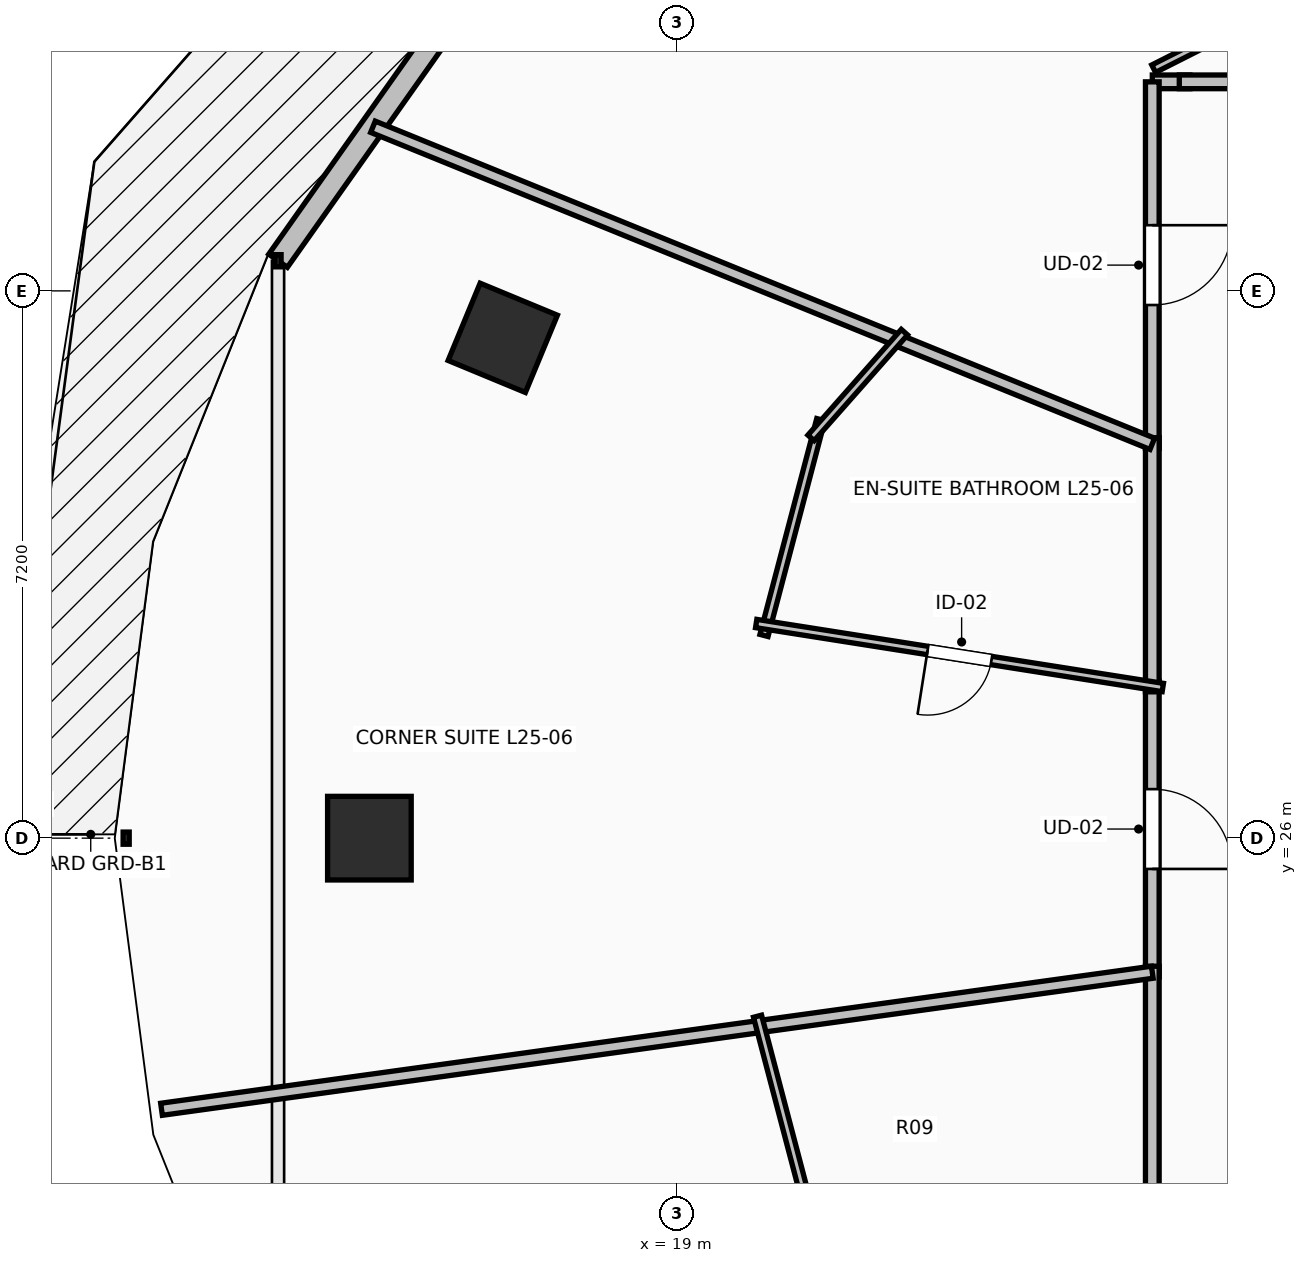
"""IFC4 building model, lengths in metres.
Left out: names, types, materials, properties, quantities, classifications, styles, units other than length and angle.
Written with IfcOpenShell. Run it as: python <this file> out.ifc"""

import sys

from ifc_helpers import new_model, si_unit, direction, frame, frame_2d, origin, origin_2d, place, context, subcontext, project, spatial, rectangle, extrude, element, fill, save


model = new_model("IFC4")
c1 = context("Model", 3, precision=1e-05, world=origin(), true_north=direction((0.0, 1.0)))
c2 = subcontext(c1, "Body", "Model", "MODEL_VIEW")
j1 = project(units=[si_unit("LENGTHUNIT", "METRE"), si_unit("PLANEANGLEUNIT", "RADIAN")], contexts=[c1])
p1 = place(None, origin())
s1 = spatial("IfcSite", under=j1, at=p1, CompositionType="ELEMENT")
p2 = place(p1, origin())
s2 = spatial("IfcBuilding", under=s1, at=p2, CompositionType="ELEMENT")
p3 = place(p2, frame((0.0, 0.0, 96.3)))
s3 = spatial("IfcBuildingStorey", under=s2, at=p3, CompositionType="ELEMENT", Elevation=96.3)
for number, where, z_axis, x_axis in (
    (1, (16.705, 32.582, 0.0), (0.0, 0.0, 1.0), (-0.924, 0.383, 0.0)),
    (2, (14.95, 26.0, 0.0), (0.0, 0.0, 1.0), (-1.0, 0.0, 0.0)),
):
    element("IfcColumn", number, at=place(p3, frame(where, z_axis=z_axis, x_axis=x_axis)), inside=s3, PredefinedType="COLUMN", context=c2, shape_type="SweptSolid", body=[
        extrude(rectangle(XDim=1.1, YDim=1.1, at=origin_2d()), origin(), (0.0, 0.0, 1.0), 3.5),
    ])
p4 = place(p3, frame((16.174, 37.028, 0.0), z_axis=(0.0, 0.0, 1.0), x_axis=(-0.57716435238, -0.81662801222, 0.0)))
e3 = element("IfcWall", 3, at=p4, inside=s3, PredefinedType="STANDARD", context=c2, shape_type="SweptSolid", body=[
    extrude(rectangle(XDim=4.202, YDim=0.3, at=frame_2d((2.101, 0.0))), origin(), (0.0, 0.0, 1.0), 3.24),
])
p5 = place(p3, frame((25.745, 35.95, 0.0), z_axis=(0.0, 0.0, 1.0), x_axis=(-1.0, 0.0, 0.0)))
e4 = element("IfcWall", 4, at=p5, inside=s3, PredefinedType="PARTITIONING", context=c2, shape_type="SweptSolid", body=[
    extrude(rectangle(XDim=0.495, YDim=0.18, at=frame_2d((0.248, 0.0))), origin(), (0.0, 0.0, 1.0), 3.24),
])
p6 = place(p3, frame((25.25, 35.95, 0.0), z_axis=(0.0, 0.0, 1.0), x_axis=(0.0, -1.0, 0.0)))
e5 = element("IfcWall", 5, at=p6, inside=s3, PredefinedType="PARTITIONING", context=c2, shape_type="SweptSolid", body=[
    extrude(rectangle(XDim=4.822, YDim=0.18, at=frame_2d((2.411, 0.0))), origin(), (0.0, 0.0, 1.0), 2.432),
])
p7 = place(p6, frame((1.886, 0.0, 0.0)))
e6 = element("IfcOpeningElement", 6, at=p7, cuts=e5, PredefinedType="OPENING", context=c2, shape_type="SweptSolid", body=[
    extrude(rectangle(XDim=1.05, YDim=2.2, at=frame_2d((0.525, 1.1))), frame((0.0, 0.105, 0.0), z_axis=(0.0, -1.0, 0.0), x_axis=(1.0, 0.0, 0.0)), (0.0, 0.0, 1.0), 0.21),
])
p8 = place(p3, frame((30.327, 35.95, 0.0), z_axis=(0.0, 0.0, 1.0), x_axis=(-1.0, 0.0, 0.0)))
e7 = element("IfcWall", 7, at=p8, inside=s3, PredefinedType="PARTITIONING", context=c2, shape_type="SweptSolid", body=[
    extrude(rectangle(XDim=4.722, YDim=0.18, at=frame_2d((2.361, 0.0))), origin(), (0.0, 0.0, 1.0), 2.432),
])
p9 = place(p3, frame((25.25, 28.065, 0.0), z_axis=(0.0, 0.0, 1.0), x_axis=(0.0, -1.0, 0.0)))
e8 = element("IfcWall", 8, at=p9, inside=s3, PredefinedType="PARTITIONING", context=c2, shape_type="SweptSolid", body=[
    extrude(rectangle(XDim=3.89, YDim=0.18, at=frame_2d((1.945, 0.0))), origin(), (0.0, 0.0, 1.0), 2.432),
])
p10 = place(p9, frame((1.42, 0.0, 0.0)))
e9 = element("IfcOpeningElement", 9, at=p10, cuts=e8, PredefinedType="OPENING", context=c2, shape_type="SweptSolid", body=[
    extrude(rectangle(XDim=1.05, YDim=2.2, at=frame_2d((0.525, 1.1))), frame((0.0, 0.105, 0.0), z_axis=(0.0, -1.0, 0.0), x_axis=(1.0, 0.0, 0.0)), (0.0, 0.0, 1.0), 0.21),
])
p11 = place(p3, frame((25.25, 31.268, 0.0), z_axis=(0.0, 0.0, 1.0), x_axis=(0.0, -1.0, 0.0)))
e10 = element("IfcWall", 10, at=p11, inside=s3, PredefinedType="PARTITIONING", context=c2, shape_type="SweptSolid", body=[
    extrude(rectangle(XDim=3.343, YDim=0.18, at=frame_2d((1.671, 0.0))), origin(), (0.0, 0.0, 1.0), 2.432),
])
p12 = place(p3, frame((25.25, 24.315, 0.0), z_axis=(0.0, 0.0, 1.0), x_axis=(0.0, -1.0, 0.0)))
e11 = element("IfcWall", 11, at=p12, inside=s3, PredefinedType="PARTITIONING", context=c2, shape_type="SweptSolid", body=[
    extrude(rectangle(XDim=3.308, YDim=0.18, at=frame_2d((1.654, 0.0))), origin(), (0.0, 0.0, 1.0), 3.24),
])
p13 = place(p3, frame((24.749, 43.041, 0.0), z_axis=(0.0, 0.0, 1.0), x_axis=(0.61384652665, -0.789425387051, 0.0)))
e12 = element("IfcWall", 12, at=p13, inside=s3, PredefinedType="PARTITIONING", context=c2, shape_type="SweptSolid", body=[
    extrude(rectangle(XDim=8.983, YDim=0.16, at=frame_2d((4.491, 0.0))), origin(), (0.0, 0.0, 1.0), 2.432),
])
p14 = place(p3, frame((25.268, 36.123, 0.0), z_axis=(0.0, 0.0, 1.0), x_axis=(0.892501687321, 0.451044053425, 0.0)))
e13 = element("IfcWall", 13, at=p14, inside=s3, PredefinedType="PARTITIONING", context=c2, shape_type="SweptSolid", body=[
    extrude(rectangle(XDim=4.049, YDim=0.11, at=frame_2d((2.025, 0.0))), origin(), (0.0, 0.0, 1.0), 2.432),
])
p15 = place(p14, frame((1.6, 0.0, 0.0)))
e14 = element("IfcOpeningElement", 14, at=p15, cuts=e13, PredefinedType="OPENING", context=c2, shape_type="SweptSolid", body=[
    extrude(rectangle(XDim=0.85, YDim=2.1, at=frame_2d((0.425, 1.05))), frame((0.0, 0.07, 0.0), z_axis=(0.0, -1.0, 0.0), x_axis=(1.0, 0.0, 0.0)), (0.0, 0.0, 1.0), 0.14),
])
p16 = place(p3, frame((14.997, 35.359, 0.0), z_axis=(0.0, 0.0, 1.0), x_axis=(0.926288615834, -0.376814808861, 0.0)))
e15 = element("IfcWall", 15, at=p16, inside=s3, PredefinedType="PARTITIONING", context=c2, shape_type="SweptSolid", body=[
    extrude(rectangle(XDim=11.069, YDim=0.16, at=frame_2d((5.534, 0.0))), origin(), (0.0, 0.0, 1.0), 2.677),
])
p17 = place(p3, frame((20.141, 28.667, 0.0), z_axis=(0.0, 0.0, 1.0), x_axis=(0.254489206931, 0.967075614187, 0.0)))
e16 = element("IfcWall", 16, at=p17, inside=s3, PredefinedType="PARTITIONING", context=c2, shape_type="SweptSolid", body=[
    extrude(rectangle(XDim=2.937, YDim=0.11, at=frame_2d((1.468, 0.0))), origin(), (0.0, 0.0, 1.0), 2.432),
])
p18 = place(p3, frame((20.76, 31.266, 0.0), z_axis=(0.0, 0.0, 1.0), x_axis=(0.662008805554, 0.749496058275, 0.0)))
e17 = element("IfcWall", 17, at=p18, inside=s3, PredefinedType="PARTITIONING", context=c2, shape_type="SweptSolid", body=[
    extrude(rectangle(XDim=1.856, YDim=0.11, at=frame_2d((0.928, 0.0))), origin(), (0.0, 0.0, 1.0), 2.922),
])
p19 = place(p3, frame((25.388, 27.982, 0.0), z_axis=(0.0, 0.0, 1.0), x_axis=(-0.98785054141, 0.155406910513, 0.0)))
e18 = element("IfcWall", 18, at=p19, inside=s3, PredefinedType="PARTITIONING", context=c2, shape_type="SweptSolid", body=[
    extrude(rectangle(XDim=5.415, YDim=0.11, at=frame_2d((2.708, 0.0))), origin(), (0.0, 0.0, 1.0), 2.432),
])
p20 = place(p19, frame((2.283, 0.0, 0.0)))
e19 = element("IfcOpeningElement", 19, at=p20, cuts=e18, PredefinedType="OPENING", context=c2, shape_type="SweptSolid", body=[
    extrude(rectangle(XDim=0.85, YDim=2.1, at=frame_2d((0.425, 1.05))), frame((0.0, 0.07, 0.0), z_axis=(0.0, -1.0, 0.0), x_axis=(1.0, 0.0, 0.0)), (0.0, 0.0, 1.0), 0.14),
])
p21 = place(p3, frame((12.215, 22.433, 0.0), z_axis=(0.0, 0.0, 1.0), x_axis=(0.990569013426, 0.137014705927, 0.0)))
e20 = element("IfcWall", 20, at=p21, inside=s3, PredefinedType="PARTITIONING", context=c2, shape_type="SweptSolid", body=[
    extrude(rectangle(XDim=13.159, YDim=0.16, at=frame_2d((6.58, 0.0))), origin(), (0.0, 0.0, 1.0), 2.677),
])
p22 = place(p3, frame((20.889, 20.494, 0.0), z_axis=(0.0, 0.0, 1.0), x_axis=(-0.254405137241, 0.967097733502, 0.0)))
e21 = element("IfcWall", 21, at=p22, inside=s3, PredefinedType="PARTITIONING", context=c2, shape_type="SweptSolid", body=[
    extrude(rectangle(XDim=3.271, YDim=0.11, at=frame_2d((1.636, 0.0))), origin(), (0.0, 0.0, 1.0), 2.922),
])
p23 = place(p7, origin())
e22 = element("IfcDoor", 22, at=p23, inside=s3, OperationType="SINGLE_SWING_LEFT", PredefinedType="DOOR", context=c2, shape_type="SweptSolid", body=[
    extrude(rectangle(XDim=1.05, YDim=2.2, at=frame_2d((0.525, 1.1))), frame((0.0, 0.025, 0.0), z_axis=(0.0, -1.0, 0.0), x_axis=(1.0, 0.0, 0.0)), (0.0, 0.0, 1.0), 0.05),
])
fill(e6, e22)
p24 = place(p10, origin())
e23 = element("IfcDoor", 23, at=p24, inside=s3, OperationType="SINGLE_SWING_RIGHT", PredefinedType="DOOR", context=c2, shape_type="SweptSolid", body=[
    extrude(rectangle(XDim=1.05, YDim=2.2, at=frame_2d((0.525, 1.1))), frame((0.0, 0.025, 0.0), z_axis=(0.0, -1.0, 0.0), x_axis=(1.0, 0.0, 0.0)), (0.0, 0.0, 1.0), 0.05),
])
fill(e9, e23)
p25 = place(p20, origin())
e24 = element("IfcDoor", 24, at=p25, inside=s3, OperationType="SINGLE_SWING_RIGHT", PredefinedType="DOOR", context=c2, shape_type="SweptSolid", body=[
    extrude(rectangle(XDim=0.85, YDim=2.1, at=frame_2d((0.425, 1.05))), frame((0.0, 0.025, 0.0), z_axis=(0.0, -1.0, 0.0), x_axis=(1.0, 0.0, 0.0)), (0.0, 0.0, 1.0), 0.05),
])
fill(e19, e24)
save(model, sys.argv[1])
